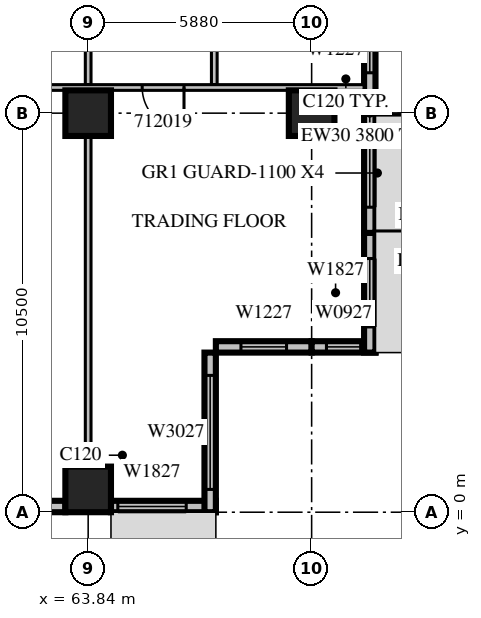
"""IFC4 building model, lengths in metres.
Left out: names, types, materials, properties, quantities, classifications, styles, units other than length and angle.
Written with IfcOpenShell. Run it as: python <this file> out.ifc"""

import sys

from ifc_helpers import new_model, si_unit, direction, frame, frame_2d, origin, origin_2d, place, context, subcontext, project, spatial, rectangle, extrude, source, transform, mapped, element, fill, save


model = new_model("IFC4")
c1 = context("Model", 3, precision=1e-05, world=origin(), true_north=direction((0.0, 1.0)))
c2 = subcontext(c1, "Body", "Model", "MODEL_VIEW")
j1 = project(units=[si_unit("LENGTHUNIT", "METRE"), si_unit("PLANEANGLEUNIT", "RADIAN")], contexts=[c1])
p1 = place(None, origin())
s1 = spatial("IfcSite", under=j1, at=p1, CompositionType="ELEMENT")
p2 = place(p1, origin())
s2 = spatial("IfcBuilding", under=s1, at=p2, CompositionType="ELEMENT")
p3 = place(p2, frame((0.0, 0.0, 61.5)))
s3 = spatial("IfcBuildingStorey", under=s2, at=p3, CompositionType="ELEMENT", Elevation=61.5)
m1 = source(origin(), c2, "Body", "SweptSolid", [
    extrude(rectangle(XDim=1.2, YDim=1.2, at=origin_2d()), origin(), (0.0, 0.0, 1.0), 4.2),
])
for number, where, z_axis, x_axis in (
    (1, (63.84, 0.6, 0.0), (0.0, 0.0, 1.0), (1.0, 0.0, 0.0)),
    (2, (63.84, 10.5, 0.0), (0.0, 0.0, 1.0), (1.0, 0.0, 0.0)),
    (3, (69.72, 10.5, 0.0), (0.0, 0.0, 1.0), (1.0, 0.0, 0.0)),
):
    element("IfcColumn", number, at=place(p3, frame(where, z_axis=z_axis, x_axis=x_axis)), inside=s3, PredefinedType="COLUMN", context=c2, shape_type="MappedRepresentation", body=[
        mapped(m1, transform((0.0, 0.0, 0.0), scale=1.0)),
    ])
m2 = source(origin(), c2, "Body", "SweptSolid", [
    extrude(rectangle(XDim=4.68, YDim=0.3, at=frame_2d((2.34, 0.0))), origin(), (0.0, 0.0, 1.0), 3.8),
])
p4 = place(p3, frame((58.56, 0.15, 0.0), z_axis=(0.0, 0.0, 1.0), x_axis=(1.0, 0.0, 0.0)))
e4 = element("IfcWall", 4, at=p4, inside=s3, PredefinedType="STANDARD", context=c2, shape_type="MappedRepresentation", body=[
    mapped(m2, transform((0.0, 0.0, 0.0), scale=1.0)),
])
m3 = source(origin(), c2, "Body", "SweptSolid", [
    extrude(rectangle(XDim=1.8, YDim=2.7, at=frame_2d((0.9, 1.35))), frame((0.0, 0.16, 0.0), z_axis=(0.0, -1.0, 0.0), x_axis=(1.0, 0.0, 0.0)), (0.0, 0.0, 1.0), 0.32),
])
p5 = place(p4, frame((0.877, 0.0, 0.6)))
e5 = element("IfcOpeningElement", 5, at=p5, cuts=e4, PredefinedType="OPENING", context=c2, shape_type="MappedRepresentation", body=[
    mapped(m3, transform((0.0, 0.0, 0.0), scale=1.0)),
])
m4 = source(origin(), c2, "Body", "SweptSolid", [
    extrude(rectangle(XDim=2.76, YDim=0.3, at=frame_2d((1.38, 0.0))), origin(), (0.0, 0.0, 1.0), 3.8),
])
p6 = place(p3, frame((64.44, 0.15, 0.0), z_axis=(0.0, 0.0, 1.0), x_axis=(1.0, 0.0, 0.0)))
e6 = element("IfcWall", 6, at=p6, inside=s3, PredefinedType="STANDARD", context=c2, shape_type="MappedRepresentation", body=[
    mapped(m4, transform((0.0, 0.0, 0.0), scale=1.0)),
])
p7 = place(p6, frame((0.18, 0.0, 0.6)))
e7 = element("IfcOpeningElement", 7, at=p7, cuts=e6, PredefinedType="OPENING", context=c2, shape_type="MappedRepresentation", body=[
    mapped(m3, transform((0.0, 0.0, 0.0), scale=1.0)),
])
m5 = source(origin(), c2, "Body", "SweptSolid", [
    extrude(rectangle(XDim=4.2, YDim=0.3, at=frame_2d((2.1, 0.0))), origin(), (0.0, 0.0, 1.0), 3.8),
])
p8 = place(p3, frame((67.05, 0.0, 0.0), z_axis=(0.0, 0.0, 1.0), x_axis=(0.0, 1.0, 0.0)))
e8 = element("IfcWall", 8, at=p8, inside=s3, PredefinedType="STANDARD", context=c2, shape_type="MappedRepresentation", body=[
    mapped(m5, transform((0.0, 0.0, 0.0), scale=1.0)),
])
m6 = source(origin(), c2, "Body", "SweptSolid", [
    extrude(rectangle(XDim=3.0, YDim=2.7, at=frame_2d((1.5, 1.35))), frame((0.0, 0.16, 0.0), z_axis=(0.0, -1.0, 0.0), x_axis=(1.0, 0.0, 0.0)), (0.0, 0.0, 1.0), 0.32),
])
p9 = place(p8, frame((0.6, 0.0, 0.6)))
e9 = element("IfcOpeningElement", 9, at=p9, cuts=e8, PredefinedType="OPENING", context=c2, shape_type="MappedRepresentation", body=[
    mapped(m6, transform((0.0, 0.0, 0.0), scale=1.0)),
])
m7 = source(origin(), c2, "Body", "SweptSolid", [
    extrude(rectangle(XDim=2.52, YDim=0.3, at=frame_2d((1.26, 0.0))), origin(), (0.0, 0.0, 1.0), 3.8),
])
p10 = place(p3, frame((67.2, 4.35, 0.0), z_axis=(0.0, 0.0, 1.0), x_axis=(1.0, 0.0, 0.0)))
e10 = element("IfcWall", 10, at=p10, inside=s3, PredefinedType="STANDARD", context=c2, shape_type="MappedRepresentation", body=[
    mapped(m7, transform((0.0, 0.0, 0.0), scale=1.0)),
])
m8 = source(origin(), c2, "Body", "SweptSolid", [
    extrude(rectangle(XDim=1.2, YDim=2.7, at=frame_2d((0.6, 1.35))), frame((0.0, 0.16, 0.0), z_axis=(0.0, -1.0, 0.0), x_axis=(1.0, 0.0, 0.0)), (0.0, 0.0, 1.0), 0.32),
])
p11 = place(p10, frame((0.66, 0.0, 0.6)))
e11 = element("IfcOpeningElement", 11, at=p11, cuts=e10, PredefinedType="OPENING", context=c2, shape_type="MappedRepresentation", body=[
    mapped(m8, transform((0.0, 0.0, 0.0), scale=1.0)),
])
m9 = source(origin(), c2, "Body", "SweptSolid", [
    extrude(rectangle(XDim=1.68, YDim=0.3, at=frame_2d((0.84, 0.0))), origin(), (0.0, 0.0, 1.0), 3.8),
])
p12 = place(p3, frame((69.72, 4.35, 0.0), z_axis=(0.0, 0.0, 1.0), x_axis=(1.0, 0.0, 0.0)))
e12 = element("IfcWall", 12, at=p12, inside=s3, PredefinedType="STANDARD", context=c2, shape_type="MappedRepresentation", body=[
    mapped(m9, transform((0.0, 0.0, 0.0), scale=1.0)),
])
m10 = source(origin(), c2, "Body", "SweptSolid", [
    extrude(rectangle(XDim=0.9, YDim=2.7, at=frame_2d((0.45, 1.35))), frame((0.0, 0.16, 0.0), z_axis=(0.0, -1.0, 0.0), x_axis=(1.0, 0.0, 0.0)), (0.0, 0.0, 1.0), 0.32),
])
p13 = place(p12, frame((0.39, 0.0, 0.6)))
e13 = element("IfcOpeningElement", 13, at=p13, cuts=e12, PredefinedType="OPENING", context=c2, shape_type="MappedRepresentation", body=[
    mapped(m10, transform((0.0, 0.0, 0.0), scale=1.0)),
])
m11 = source(origin(), c2, "Body", "SweptSolid", [
    extrude(rectangle(XDim=3.15, YDim=0.3, at=frame_2d((1.575, 0.0))), origin(), (0.0, 0.0, 1.0), 3.8),
])
p14 = place(p3, frame((71.25, 4.2, 0.0), z_axis=(0.0, 0.0, 1.0), x_axis=(0.0, 1.0, 0.0)))
e14 = element("IfcWall", 14, at=p14, inside=s3, PredefinedType="STANDARD", context=c2, shape_type="MappedRepresentation", body=[
    mapped(m11, transform((0.0, 0.0, 0.0), scale=1.0)),
])
p15 = place(p14, frame((0.675, 0.0, 0.6)))
e15 = element("IfcOpeningElement", 15, at=p15, cuts=e14, PredefinedType="OPENING", context=c2, shape_type="MappedRepresentation", body=[
    mapped(m3, transform((0.0, 0.0, 0.0), scale=1.0)),
])
p16 = place(p3, frame((71.25, 7.35, 0.0), z_axis=(0.0, 0.0, 1.0), x_axis=(0.0, 1.0, 0.0)))
e16 = element("IfcWall", 16, at=p16, inside=s3, PredefinedType="STANDARD", context=c2, shape_type="MappedRepresentation", body=[
    mapped(m11, transform((0.0, 0.0, 0.0), scale=1.0)),
])
m12 = source(origin(), c2, "Body", "SweptSolid", [
    extrude(rectangle(XDim=1.8, YDim=2.4, at=frame_2d((0.9, 1.2))), frame((0.0, 0.16, 0.0), z_axis=(0.0, -1.0, 0.0), x_axis=(1.0, 0.0, 0.0)), (0.0, 0.0, 1.0), 0.32),
])
p17 = place(p16, frame((0.675, 0.0, 0.0)))
e17 = element("IfcOpeningElement", 17, at=p17, cuts=e16, PredefinedType="OPENING", context=c2, shape_type="MappedRepresentation", body=[
    mapped(m12, transform((0.0, 0.0, 0.0), scale=1.0)),
])
m13 = source(origin(), c2, "Body", "SweptSolid", [
    extrude(rectangle(XDim=6.3, YDim=0.3, at=frame_2d((3.15, 0.0))), origin(), (0.0, 0.0, 1.0), 3.8),
])
p18 = place(p3, frame((71.25, 10.5, 0.0), z_axis=(0.0, 0.0, 1.0), x_axis=(0.0, 1.0, 0.0)))
e18 = element("IfcWall", 18, at=p18, inside=s3, PredefinedType="STANDARD", context=c2, shape_type="MappedRepresentation", body=[
    mapped(m13, transform((0.0, 0.0, 0.0), scale=1.0)),
])
p19 = place(p18, frame((1.062, 0.0, 0.6)))
e19 = element("IfcOpeningElement", 19, at=p19, cuts=e18, PredefinedType="OPENING", context=c2, shape_type="MappedRepresentation", body=[
    mapped(m8, transform((0.0, 0.0, 0.0), scale=1.0)),
])
m14 = source(origin(), c2, "Body", "SweptSolid", [
    extrude(rectangle(XDim=3.45, YDim=0.15, at=frame_2d((1.725, 0.0))), origin(), (0.0, 0.0, 1.0), 3.8),
])
p20 = place(p3, frame((67.158, 11.25, 0.0), z_axis=(0.0, 0.0, 1.0), x_axis=(0.0, 1.0, 0.0)))
e20 = element("IfcWall", 20, at=p20, inside=s3, PredefinedType="PARTITIONING", context=c2, shape_type="MappedRepresentation", body=[
    mapped(m14, transform((0.0, 0.0, 0.0), scale=1.0)),
])
m15 = source(origin(), c2, "Body", "SweptSolid", [
    extrude(rectangle(XDim=8.702, YDim=0.15, at=frame_2d((4.351, 0.0))), origin(), (0.0, 0.0, 1.0), 3.8),
])
p21 = place(p3, frame((63.84, 1.199, 0.0), z_axis=(0.0, 0.0, 1.0), x_axis=(0.0, 1.0, 0.0)))
e21 = element("IfcWall", 21, at=p21, inside=s3, PredefinedType="PARTITIONING", context=c2, shape_type="MappedRepresentation", body=[
    mapped(m15, transform((0.0, 0.0, 0.0), scale=1.0)),
])
p22 = place(p3, frame((63.84, 11.25, 0.0), z_axis=(0.0, 0.0, 1.0), x_axis=(0.0, 1.0, 0.0)))
e22 = element("IfcWall", 22, at=p22, inside=s3, PredefinedType="PARTITIONING", context=c2, shape_type="MappedRepresentation", body=[
    mapped(m14, transform((0.0, 0.0, 0.0), scale=1.0)),
])
m16 = source(origin(), c2, "Body", "SweptSolid", [
    extrude(rectangle(XDim=24.9, YDim=0.15, at=frame_2d((12.45, 0.0))), origin(), (0.0, 0.0, 1.0), 3.8),
])
p23 = place(p3, frame((71.1, 11.175, 0.0), z_axis=(0.0, 0.0, 1.0), x_axis=(-1.0, 0.0, 0.0)))
e23 = element("IfcWall", 23, at=p23, inside=s3, PredefinedType="PARTITIONING", context=c2, shape_type="MappedRepresentation", body=[
    mapped(m16, transform((0.0, 0.0, 0.0), scale=1.0)),
])
m17 = source(origin(), c2, "Body", "SweptSolid", [
    extrude(rectangle(XDim=1.1, YDim=2.1, at=frame_2d((0.55, 1.05))), frame((0.0, 0.085, 0.0), z_axis=(0.0, -1.0, 0.0), x_axis=(1.0, 0.0, 0.0)), (0.0, 0.0, 1.0), 0.17),
])
p24 = place(p23, frame((22.753, 0.0, 0.0)))
e24 = element("IfcOpeningElement", 24, at=p24, cuts=e23, PredefinedType="OPENING", context=c2, shape_type="MappedRepresentation", body=[
    mapped(m17, transform((0.0, 0.0, 0.0), scale=1.0)),
])
p25 = place(p23, frame((8.683, 0.0, 0.0)))
e25 = element("IfcOpeningElement", 25, at=p25, cuts=e23, PredefinedType="OPENING", context=c2, shape_type="MappedRepresentation", body=[
    mapped(m17, transform((0.0, 0.0, 0.0), scale=1.0)),
])
p26 = place(p23, frame((4.738, 0.0, 0.0)))
e26 = element("IfcOpeningElement", 26, at=p26, cuts=e23, PredefinedType="OPENING", context=c2, shape_type="MappedRepresentation", body=[
    mapped(m17, transform((0.0, 0.0, 0.0), scale=1.0)),
])
m18 = source(origin(), c2, "Body", "SweptSolid", [
    extrude(rectangle(XDim=1.8, YDim=2.7, at=frame_2d((0.9, 1.35))), frame((0.0, 0.03, 0.0), z_axis=(0.0, -1.0, 0.0), x_axis=(1.0, 0.0, 0.0)), (0.0, 0.0, 1.0), 0.06),
])
p27 = place(p7, origin())
e27 = element("IfcWindow", 27, at=p27, inside=s3, PartitioningType="SINGLE_PANEL", PredefinedType="WINDOW", context=c2, shape_type="MappedRepresentation", body=[
    mapped(m18, transform((0.0, 0.0, 0.0), scale=1.0)),
])
fill(e7, e27)
m19 = source(origin(), c2, "Body", "SweptSolid", [
    extrude(rectangle(XDim=3.0, YDim=2.7, at=frame_2d((1.5, 1.35))), frame((0.0, 0.03, 0.0), z_axis=(0.0, -1.0, 0.0), x_axis=(1.0, 0.0, 0.0)), (0.0, 0.0, 1.0), 0.06),
])
p28 = place(p9, origin())
e28 = element("IfcWindow", 28, at=p28, inside=s3, PartitioningType="SINGLE_PANEL", PredefinedType="WINDOW", context=c2, shape_type="MappedRepresentation", body=[
    mapped(m19, transform((0.0, 0.0, 0.0), scale=1.0)),
])
fill(e9, e28)
m20 = source(origin(), c2, "Body", "SweptSolid", [
    extrude(rectangle(XDim=1.2, YDim=2.7, at=frame_2d((0.6, 1.35))), frame((0.0, 0.03, 0.0), z_axis=(0.0, -1.0, 0.0), x_axis=(1.0, 0.0, 0.0)), (0.0, 0.0, 1.0), 0.06),
])
p29 = place(p11, origin())
e29 = element("IfcWindow", 29, at=p29, inside=s3, PartitioningType="SINGLE_PANEL", PredefinedType="WINDOW", context=c2, shape_type="MappedRepresentation", body=[
    mapped(m20, transform((0.0, 0.0, 0.0), scale=1.0)),
])
fill(e11, e29)
m21 = source(origin(), c2, "Body", "SweptSolid", [
    extrude(rectangle(XDim=0.9, YDim=2.7, at=frame_2d((0.45, 1.35))), frame((0.0, 0.03, 0.0), z_axis=(0.0, -1.0, 0.0), x_axis=(1.0, 0.0, 0.0)), (0.0, 0.0, 1.0), 0.06),
])
p30 = place(p13, origin())
e30 = element("IfcWindow", 30, at=p30, inside=s3, PartitioningType="SINGLE_PANEL", PredefinedType="WINDOW", context=c2, shape_type="MappedRepresentation", body=[
    mapped(m21, transform((0.0, 0.0, 0.0), scale=1.0)),
])
fill(e13, e30)
p31 = place(p15, origin())
e31 = element("IfcWindow", 31, at=p31, inside=s3, PartitioningType="SINGLE_PANEL", PredefinedType="WINDOW", context=c2, shape_type="MappedRepresentation", body=[
    mapped(m18, transform((0.0, 0.0, 0.0), scale=1.0)),
])
fill(e15, e31)
m22 = source(origin(), c2, "Body", "SweptSolid", [
    extrude(rectangle(XDim=1.8, YDim=2.4, at=frame_2d((0.9, 1.2))), frame((0.0, 0.025, 0.0), z_axis=(0.0, -1.0, 0.0), x_axis=(1.0, 0.0, 0.0)), (0.0, 0.0, 1.0), 0.05),
])
p32 = place(p17, origin())
e32 = element("IfcDoor", 32, at=p32, inside=s3, OperationType="SLIDING_TO_LEFT", PredefinedType="DOOR", context=c2, shape_type="MappedRepresentation", body=[
    mapped(m22, transform((0.0, 0.0, 0.0), scale=1.0)),
])
fill(e17, e32)
p33 = place(p19, origin())
e33 = element("IfcWindow", 33, at=p33, inside=s3, PartitioningType="SINGLE_PANEL", PredefinedType="WINDOW", context=c2, shape_type="MappedRepresentation", body=[
    mapped(m20, transform((0.0, 0.0, 0.0), scale=1.0)),
])
fill(e19, e33)
m23 = source(origin(), c2, "Body", "SweptSolid", [
    extrude(rectangle(XDim=1.1, YDim=2.1, at=frame_2d((0.55, 1.05))), frame((0.0, 0.025, 0.0), z_axis=(0.0, -1.0, 0.0), x_axis=(1.0, 0.0, 0.0)), (0.0, 0.0, 1.0), 0.05),
])
p34 = place(p26, origin())
e34 = element("IfcDoor", 34, at=p34, inside=s3, OperationType="SINGLE_SWING_LEFT", PredefinedType="DOOR", context=c2, shape_type="MappedRepresentation", body=[
    mapped(m23, transform((0.0, 0.0, 0.0), scale=1.0)),
])
fill(e26, e34)
save(model, sys.argv[1])
